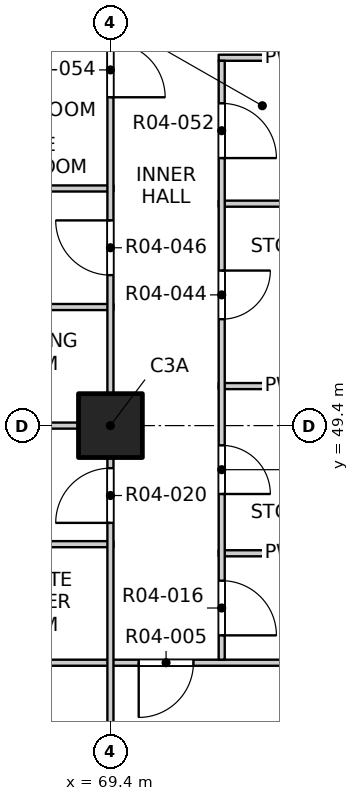
"""IFC4 building model, lengths in metres.
Left out: names, types, materials, properties, quantities, classifications, styles, units other than length and angle.
Written with IfcOpenShell. Run it as: python <this file> out.ifc"""

import sys

from ifc_helpers import new_model, si_unit, direction, frame, frame_2d, origin, origin_2d, place, context, subcontext, project, spatial, rectangle, extrude, element, fill, save


model = new_model("IFC4")
c1 = context("Model", 3, precision=1e-05, world=origin(), true_north=direction((0.0, 1.0)))
c2 = subcontext(c1, "Body", "Model", "MODEL_VIEW")
j1 = project(units=[si_unit("LENGTHUNIT", "METRE"), si_unit("PLANEANGLEUNIT", "RADIAN")], contexts=[c1])
p1 = place(None, origin())
s1 = spatial("IfcSite", under=j1, at=p1, CompositionType="ELEMENT")
p2 = place(p1, origin())
s2 = spatial("IfcBuilding", under=s1, at=p2, CompositionType="ELEMENT")
p3 = place(p2, frame((0.0, 0.0, 58.0)))
s3 = spatial("IfcBuildingStorey", under=s2, at=p3, CompositionType="ELEMENT", Elevation=58.0)
p4 = place(p3, frame((69.4, 49.4, -0.25), z_axis=(0.0, 0.0, 1.0), x_axis=(1.0, 0.0, 0.0)))
e1 = element("IfcColumn", 1, at=p4, inside=s3, PredefinedType="COLUMN", context=c2, shape_type="SweptSolid", body=[
    extrude(rectangle(XDim=1.05, YDim=1.05, at=origin_2d()), origin(), (0.0, 0.0, 1.0), 3.4),
])
p5 = place(p3, frame((61.9, 45.5, 0.0), z_axis=(0.0, 0.0, 1.0), x_axis=(1.0, 0.0, 0.0)))
e2 = element("IfcWall", 2, at=p5, inside=s3, PredefinedType="PARTITIONING", context=c2, shape_type="SweptSolid", body=[
    extrude(rectangle(XDim=11.5, YDim=0.1, at=frame_2d((5.75, 0.0))), origin(), (0.0, 0.0, 1.0), 3.15),
])
p6 = place(p5, frame((7.965, 0.0, 0.0)))
e3 = element("IfcOpeningElement", 3, at=p6, cuts=e2, PredefinedType="OPENING", context=c2, shape_type="SweptSolid", body=[
    extrude(rectangle(XDim=0.9, YDim=2.1, at=frame_2d((0.45, 1.05))), frame((0.0, 0.06, 0.0), z_axis=(0.0, -1.0, 0.0), x_axis=(1.0, 0.0, 0.0)), (0.0, 0.0, 1.0), 0.12),
])
p7 = place(p3, frame((71.18, 47.3, 0.0), z_axis=(0.0, 0.0, 1.0), x_axis=(1.0, 0.0, 0.0)))
e4 = element("IfcWall", 4, at=p7, inside=s3, PredefinedType="PARTITIONING", context=c2, shape_type="SweptSolid", body=[
    extrude(rectangle(XDim=2.22, YDim=0.1, at=frame_2d((1.11, 0.0))), origin(), (0.0, 0.0, 1.0), 3.15),
])
p8 = place(p3, frame((66.05, 47.45, 0.0), z_axis=(0.0, 0.0, 1.0), x_axis=(1.0, 0.0, 0.0)))
e5 = element("IfcWall", 5, at=p8, inside=s3, PredefinedType="PARTITIONING", context=c2, shape_type="SweptSolid", body=[
    extrude(rectangle(XDim=3.4, YDim=0.1, at=frame_2d((1.7, 0.0))), origin(), (0.0, 0.0, 1.0), 3.15),
])
p9 = place(p3, frame((61.9, 49.4, 0.0), z_axis=(0.0, 0.0, 1.0), x_axis=(1.0, 0.0, 0.0)))
e6 = element("IfcWall", 6, at=p9, inside=s3, PredefinedType="PARTITIONING", context=c2, shape_type="SweptSolid", body=[
    extrude(rectangle(XDim=7.55, YDim=0.1, at=frame_2d((3.775, 0.0))), origin(), (0.0, 0.0, 1.0), 2.55),
])
p10 = place(p3, frame((71.18, 50.05, 0.0), z_axis=(0.0, 0.0, 1.0), x_axis=(1.0, 0.0, 0.0)))
e7 = element("IfcWall", 7, at=p10, inside=s3, PredefinedType="PARTITIONING", context=c2, shape_type="SweptSolid", body=[
    extrude(rectangle(XDim=2.22, YDim=0.1, at=frame_2d((1.11, 0.0))), origin(), (0.0, 0.0, 1.0), 3.15),
])
p11 = place(p3, frame((66.05, 51.35, 0.0), z_axis=(0.0, 0.0, 1.0), x_axis=(1.0, 0.0, 0.0)))
e8 = element("IfcWall", 8, at=p11, inside=s3, PredefinedType="PARTITIONING", context=c2, shape_type="SweptSolid", body=[
    extrude(rectangle(XDim=3.4, YDim=0.1, at=frame_2d((1.7, 0.0))), origin(), (0.0, 0.0, 1.0), 3.15),
])
p12 = place(p3, frame((71.18, 53.05, 0.0), z_axis=(0.0, 0.0, 1.0), x_axis=(1.0, 0.0, 0.0)))
e9 = element("IfcWall", 9, at=p12, inside=s3, PredefinedType="PARTITIONING", context=c2, shape_type="SweptSolid", body=[
    extrude(rectangle(XDim=2.22, YDim=0.1, at=frame_2d((1.11, 0.0))), origin(), (0.0, 0.0, 1.0), 3.15),
])
p13 = place(p3, frame((61.9, 53.3, 0.0), z_axis=(0.0, 0.0, 1.0), x_axis=(1.0, 0.0, 0.0)))
e10 = element("IfcWall", 10, at=p13, inside=s3, PredefinedType="PARTITIONING", context=c2, shape_type="SweptSolid", body=[
    extrude(rectangle(XDim=7.55, YDim=0.1, at=frame_2d((3.775, 0.0))), origin(), (0.0, 0.0, 1.0), 3.15),
])
p14 = place(p3, frame((71.18, 55.45, 0.0), z_axis=(0.0, 0.0, 1.0), x_axis=(1.0, 0.0, 0.0)))
e11 = element("IfcWall", 11, at=p14, inside=s3, PredefinedType="PARTITIONING", context=c2, shape_type="SweptSolid", body=[
    extrude(rectangle(XDim=2.22, YDim=0.1, at=frame_2d((1.11, 0.0))), origin(), (0.0, 0.0, 1.0), 3.15),
])
p15 = place(p3, frame((69.4, 41.9, 0.0), z_axis=(0.0, 0.0, 1.0), x_axis=(0.0, 1.0, 0.0)))
e12 = element("IfcWall", 12, at=p15, inside=s3, PredefinedType="PARTITIONING", context=c2, shape_type="SweptSolid", body=[
    extrude(rectangle(XDim=7.5, YDim=0.1, at=frame_2d((3.75, 0.0))), origin(), (0.0, 0.0, 1.0), 2.55),
])
p16 = place(p15, frame((1.2, 0.0, 0.0)))
e13 = element("IfcOpeningElement", 13, at=p16, cuts=e12, PredefinedType="OPENING", context=c2, shape_type="SweptSolid", body=[
    extrude(rectangle(XDim=0.9, YDim=2.1, at=frame_2d((0.45, 1.05))), frame((0.0, 0.06, 0.0), z_axis=(0.0, -1.0, 0.0), x_axis=(1.0, 0.0, 0.0)), (0.0, 0.0, 1.0), 0.12),
])
p17 = place(p15, frame((5.9, 0.0, 0.0)))
e14 = element("IfcOpeningElement", 14, at=p17, cuts=e12, PredefinedType="OPENING", context=c2, shape_type="SweptSolid", body=[
    extrude(rectangle(XDim=0.9, YDim=2.1, at=frame_2d((0.45, 1.05))), frame((0.0, 0.06, 0.0), z_axis=(0.0, -1.0, 0.0), x_axis=(1.0, 0.0, 0.0)), (0.0, 0.0, 1.0), 0.12),
])
p18 = place(p3, frame((69.4, 49.4, 0.0), z_axis=(0.0, 0.0, 1.0), x_axis=(0.0, 1.0, 0.0)))
e15 = element("IfcWall", 15, at=p18, inside=s3, PredefinedType="PARTITIONING", context=c2, shape_type="SweptSolid", body=[
    extrude(rectangle(XDim=31.2, YDim=0.1, at=frame_2d((15.6, 0.0))), origin(), (0.0, 0.0, 1.0), 3.15),
])
p19 = place(p18, frame((2.475, 0.0, 0.0)))
e16 = element("IfcOpeningElement", 16, at=p19, cuts=e15, PredefinedType="OPENING", context=c2, shape_type="SweptSolid", body=[
    extrude(rectangle(XDim=0.9, YDim=2.1, at=frame_2d((0.45, 1.05))), frame((0.0, 0.06, 0.0), z_axis=(0.0, -1.0, 0.0), x_axis=(1.0, 0.0, 0.0)), (0.0, 0.0, 1.0), 0.12),
])
p20 = place(p18, frame((5.4, 0.0, 0.0)))
e17 = element("IfcOpeningElement", 17, at=p20, cuts=e15, PredefinedType="OPENING", context=c2, shape_type="SweptSolid", body=[
    extrude(rectangle(XDim=0.9, YDim=2.1, at=frame_2d((0.45, 1.05))), frame((0.0, 0.06, 0.0), z_axis=(0.0, -1.0, 0.0), x_axis=(1.0, 0.0, 0.0)), (0.0, 0.0, 1.0), 0.12),
])
p21 = place(p18, frame((10.275, 0.0, 0.0)))
e18 = element("IfcOpeningElement", 18, at=p21, cuts=e15, PredefinedType="OPENING", context=c2, shape_type="SweptSolid", body=[
    extrude(rectangle(XDim=0.9, YDim=2.1, at=frame_2d((0.45, 1.05))), frame((0.0, 0.06, 0.0), z_axis=(0.0, -1.0, 0.0), x_axis=(1.0, 0.0, 0.0)), (0.0, 0.0, 1.0), 0.12),
])
p22 = place(p18, frame((13.2, 0.0, 0.0)))
e19 = element("IfcOpeningElement", 19, at=p22, cuts=e15, PredefinedType="OPENING", context=c2, shape_type="SweptSolid", body=[
    extrude(rectangle(XDim=0.9, YDim=2.1, at=frame_2d((0.45, 1.05))), frame((0.0, 0.06, 0.0), z_axis=(0.0, -1.0, 0.0), x_axis=(1.0, 0.0, 0.0)), (0.0, 0.0, 1.0), 0.12),
])
p23 = place(p18, frame((18.075, 0.0, 0.0)))
e20 = element("IfcOpeningElement", 20, at=p23, cuts=e15, PredefinedType="OPENING", context=c2, shape_type="SweptSolid", body=[
    extrude(rectangle(XDim=0.9, YDim=2.1, at=frame_2d((0.45, 1.05))), frame((0.0, 0.06, 0.0), z_axis=(0.0, -1.0, 0.0), x_axis=(1.0, 0.0, 0.0)), (0.0, 0.0, 1.0), 0.12),
])
p24 = place(p18, frame((21.8, 0.0, 0.0)))
e21 = element("IfcOpeningElement", 21, at=p24, cuts=e15, PredefinedType="OPENING", context=c2, shape_type="SweptSolid", body=[
    extrude(rectangle(XDim=0.9, YDim=2.1, at=frame_2d((0.45, 1.05))), frame((0.0, 0.06, 0.0), z_axis=(0.0, -1.0, 0.0), x_axis=(1.0, 0.0, 0.0)), (0.0, 0.0, 1.0), 0.12),
])
p25 = place(p18, frame((25.875, 0.0, 0.0)))
e22 = element("IfcOpeningElement", 22, at=p25, cuts=e15, PredefinedType="OPENING", context=c2, shape_type="SweptSolid", body=[
    extrude(rectangle(XDim=0.9, YDim=2.1, at=frame_2d((0.45, 1.05))), frame((0.0, 0.06, 0.0), z_axis=(0.0, -1.0, 0.0), x_axis=(1.0, 0.0, 0.0)), (0.0, 0.0, 1.0), 0.12),
])
p26 = place(p18, frame((29.6, 0.0, 0.0)))
e23 = element("IfcOpeningElement", 23, at=p26, cuts=e15, PredefinedType="OPENING", context=c2, shape_type="SweptSolid", body=[
    extrude(rectangle(XDim=0.9, YDim=2.1, at=frame_2d((0.45, 1.05))), frame((0.0, 0.06, 0.0), z_axis=(0.0, -1.0, 0.0), x_axis=(1.0, 0.0, 0.0)), (0.0, 0.0, 1.0), 0.12),
])
p27 = place(p3, frame((71.23, 45.55, 0.0), z_axis=(0.0, 0.0, 1.0), x_axis=(0.0, 1.0, 0.0)))
e24 = element("IfcWall", 24, at=p27, inside=s3, PredefinedType="PARTITIONING", context=c2, shape_type="SweptSolid", body=[
    extrude(rectangle(XDim=9.85, YDim=0.1, at=frame_2d((4.925, 0.0))), origin(), (0.0, 0.0, 1.0), 3.15),
])
p28 = place(p27, frame((0.4, 0.0, 0.0)))
e25 = element("IfcOpeningElement", 25, at=p28, cuts=e24, PredefinedType="OPENING", context=c2, shape_type="SweptSolid", body=[
    extrude(rectangle(XDim=0.9, YDim=2.1, at=frame_2d((0.45, 1.05))), frame((0.0, 0.06, 0.0), z_axis=(0.0, -1.0, 0.0), x_axis=(1.0, 0.0, 0.0)), (0.0, 0.0, 1.0), 0.12),
])
p29 = place(p27, frame((2.725, 0.0, 0.0)))
e26 = element("IfcOpeningElement", 26, at=p29, cuts=e24, PredefinedType="OPENING", context=c2, shape_type="SweptSolid", body=[
    extrude(rectangle(XDim=0.8, YDim=2.1, at=frame_2d((0.4, 1.05))), frame((0.0, 0.06, 0.0), z_axis=(0.0, -1.0, 0.0), x_axis=(1.0, 0.0, 0.0)), (0.0, 0.0, 1.0), 0.12),
])
p30 = place(p27, frame((5.6, 0.0, 0.0)))
e27 = element("IfcOpeningElement", 27, at=p30, cuts=e24, PredefinedType="OPENING", context=c2, shape_type="SweptSolid", body=[
    extrude(rectangle(XDim=0.8, YDim=2.1, at=frame_2d((0.4, 1.05))), frame((0.0, 0.06, 0.0), z_axis=(0.0, -1.0, 0.0), x_axis=(1.0, 0.0, 0.0)), (0.0, 0.0, 1.0), 0.12),
])
p31 = place(p27, frame((8.25, 0.0, 0.0)))
e28 = element("IfcOpeningElement", 28, at=p31, cuts=e24, PredefinedType="OPENING", context=c2, shape_type="SweptSolid", body=[
    extrude(rectangle(XDim=0.9, YDim=2.1, at=frame_2d((0.45, 1.05))), frame((0.0, 0.06, 0.0), z_axis=(0.0, -1.0, 0.0), x_axis=(1.0, 0.0, 0.0)), (0.0, 0.0, 1.0), 0.12),
])
p32 = place(p6, origin())
e29 = element("IfcDoor", 29, at=p32, inside=s3, OperationType="SINGLE_SWING_RIGHT", PredefinedType="DOOR", context=c2, shape_type="SweptSolid", body=[
    extrude(rectangle(XDim=0.9, YDim=2.1, at=frame_2d((0.45, 1.05))), frame((0.0, 0.025, 0.0), z_axis=(0.0, -1.0, 0.0), x_axis=(1.0, 0.0, 0.0)), (0.0, 0.0, 1.0), 0.05),
])
fill(e3, e29)
p33 = place(p28, origin())
e30 = element("IfcDoor", 30, at=p33, inside=s3, OperationType="SINGLE_SWING_RIGHT", PredefinedType="DOOR", context=c2, shape_type="SweptSolid", body=[
    extrude(rectangle(XDim=0.9, YDim=2.1, at=frame_2d((0.45, 1.05))), frame((0.0, 0.025, 0.0), z_axis=(0.0, -1.0, 0.0), x_axis=(1.0, 0.0, 0.0)), (0.0, 0.0, 1.0), 0.05),
])
fill(e25, e30)
p34 = place(p17, origin())
e31 = element("IfcDoor", 31, at=p34, inside=s3, OperationType="SINGLE_SWING_LEFT", PredefinedType="DOOR", context=c2, shape_type="SweptSolid", body=[
    extrude(rectangle(XDim=0.9, YDim=2.1, at=frame_2d((0.45, 1.05))), frame((0.0, 0.025, 0.0), z_axis=(0.0, -1.0, 0.0), x_axis=(1.0, 0.0, 0.0)), (0.0, 0.0, 1.0), 0.05),
])
fill(e14, e31)
p35 = place(p29, origin())
e32 = element("IfcDoor", 32, at=p35, inside=s3, OperationType="SINGLE_SWING_RIGHT", PredefinedType="DOOR", context=c2, shape_type="SweptSolid", body=[
    extrude(rectangle(XDim=0.8, YDim=2.1, at=frame_2d((0.4, 1.05))), frame((0.0, 0.025, 0.0), z_axis=(0.0, -1.0, 0.0), x_axis=(1.0, 0.0, 0.0)), (0.0, 0.0, 1.0), 0.05),
])
fill(e26, e32)
p36 = place(p30, origin())
e33 = element("IfcDoor", 33, at=p36, inside=s3, OperationType="SINGLE_SWING_LEFT", PredefinedType="DOOR", context=c2, shape_type="SweptSolid", body=[
    extrude(rectangle(XDim=0.8, YDim=2.1, at=frame_2d((0.4, 1.05))), frame((0.0, 0.025, 0.0), z_axis=(0.0, -1.0, 0.0), x_axis=(1.0, 0.0, 0.0)), (0.0, 0.0, 1.0), 0.05),
])
fill(e27, e33)
p37 = place(p19, origin())
e34 = element("IfcDoor", 34, at=p37, inside=s3, OperationType="SINGLE_SWING_RIGHT", PredefinedType="DOOR", context=c2, shape_type="SweptSolid", body=[
    extrude(rectangle(XDim=0.9, YDim=2.1, at=frame_2d((0.45, 1.05))), frame((0.0, 0.025, 0.0), z_axis=(0.0, -1.0, 0.0), x_axis=(1.0, 0.0, 0.0)), (0.0, 0.0, 1.0), 0.05),
])
fill(e16, e34)
p38 = place(p31, origin())
e35 = element("IfcDoor", 35, at=p38, inside=s3, OperationType="SINGLE_SWING_RIGHT", PredefinedType="DOOR", context=c2, shape_type="SweptSolid", body=[
    extrude(rectangle(XDim=0.9, YDim=2.1, at=frame_2d((0.45, 1.05))), frame((0.0, 0.025, 0.0), z_axis=(0.0, -1.0, 0.0), x_axis=(1.0, 0.0, 0.0)), (0.0, 0.0, 1.0), 0.05),
])
fill(e28, e35)
p39 = place(p20, origin())
e36 = element("IfcDoor", 36, at=p39, inside=s3, OperationType="SINGLE_SWING_RIGHT", PredefinedType="DOOR", context=c2, shape_type="SweptSolid", body=[
    extrude(rectangle(XDim=0.9, YDim=2.1, at=frame_2d((0.45, 1.05))), frame((0.0, 0.025, 0.0), z_axis=(0.0, -1.0, 0.0), x_axis=(1.0, 0.0, 0.0)), (0.0, 0.0, 1.0), 0.05),
])
fill(e17, e36)
save(model, sys.argv[1])
